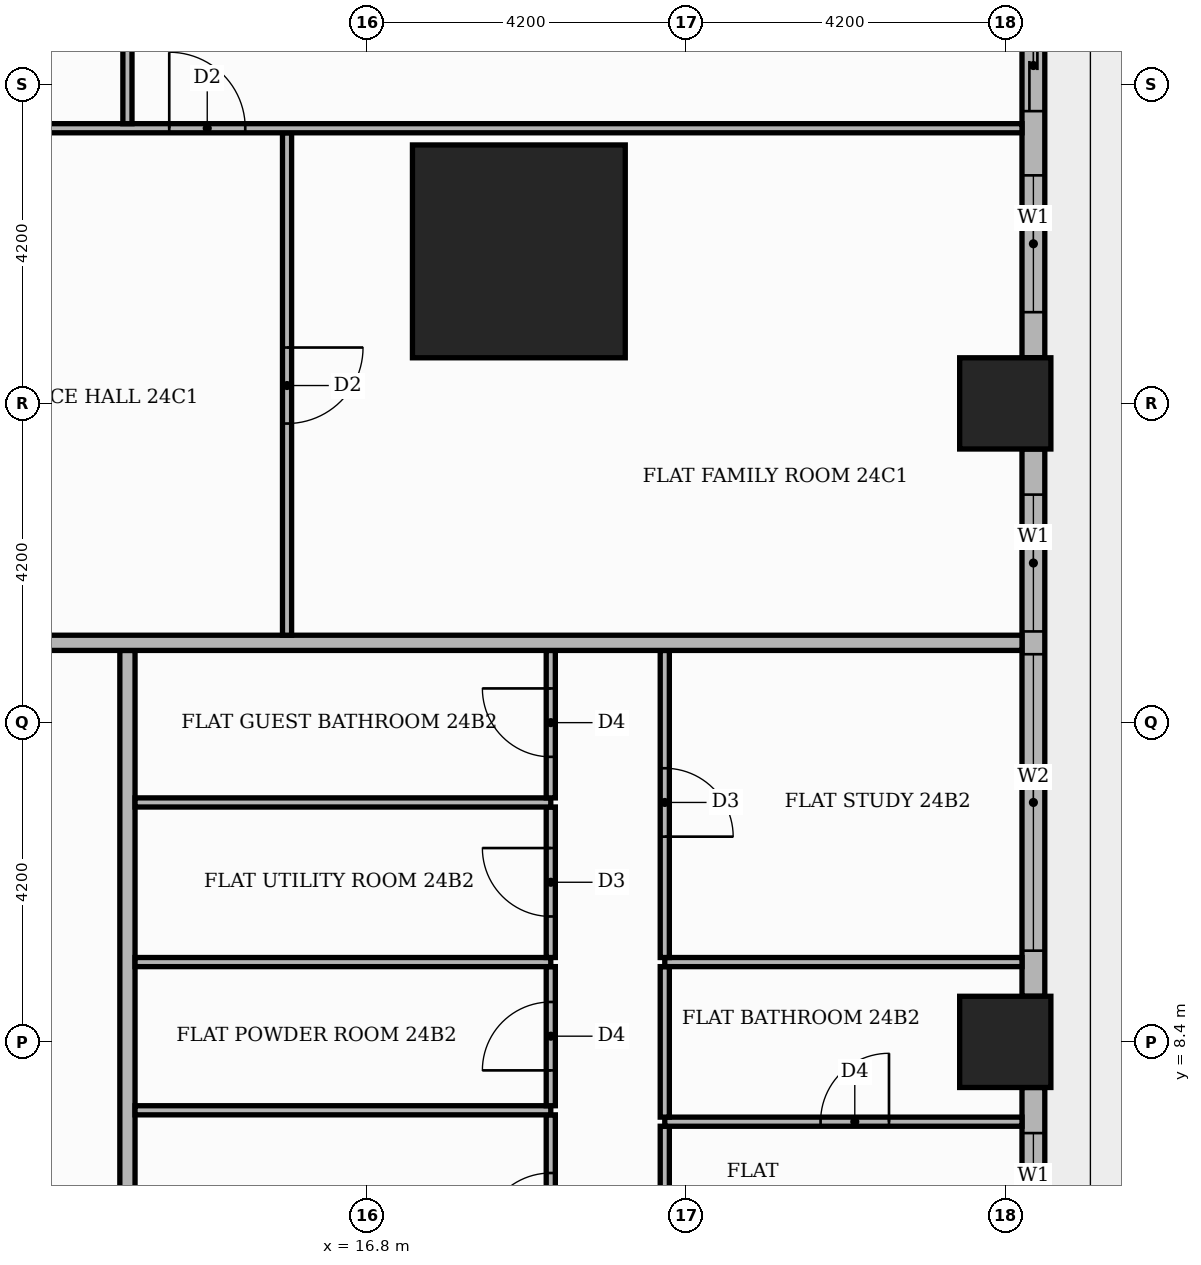
"""IFC4 building model, lengths in metres.
Left out: names, types, materials, properties, quantities, classifications, styles, units other than length and angle.
Written with IfcOpenShell. Run it as: python <this file> out.ifc"""

import sys

from ifc_helpers import new_model, si_unit, direction, frame, frame_2d, origin, origin_2d, place, context, subcontext, project, spatial, rectangle, extrude, element, fill, save


model = new_model("IFC4")
c1 = context("Model", 3, precision=1e-05, world=origin(), true_north=direction((0.0, 1.0)))
c2 = subcontext(c1, "Body", "Model", "MODEL_VIEW")
j1 = project(units=[si_unit("LENGTHUNIT", "METRE"), si_unit("PLANEANGLEUNIT", "RADIAN")], contexts=[c1])
p1 = place(None, origin())
s1 = spatial("IfcSite", under=j1, at=p1, CompositionType="ELEMENT")
p2 = place(p1, origin())
s2 = spatial("IfcBuilding", under=s1, at=p2, CompositionType="ELEMENT")
p3 = place(p2, frame((0.0, 0.0, 102.6)))
s3 = spatial("IfcBuildingStorey", under=s2, at=p3, CompositionType="ELEMENT", Elevation=102.6)
p4 = place(p3, frame((18.8, 18.8, 0.0), z_axis=(0.0, 0.0, 1.0), x_axis=(1.0, 0.0, 0.0)))
e1 = element("IfcColumn", 1, at=p4, inside=s3, PredefinedType="COLUMN", context=c2, shape_type="SweptSolid", body=[
    extrude(rectangle(XDim=2.8, YDim=2.8, at=origin_2d()), origin(), (0.0, 0.0, 1.0), 3.9),
])
for number, where, z_axis, x_axis in (
    (2, (25.2, 8.4, 0.0), (0.0, 0.0, 1.0), (1.0, 0.0, 0.0)),
    (3, (25.2, 16.8, 0.0), (0.0, 0.0, 1.0), (1.0, 0.0, 0.0)),
):
    element("IfcColumn", number, at=place(p3, frame(where, z_axis=z_axis, x_axis=x_axis)), inside=s3, PredefinedType="COLUMN", context=c2, shape_type="SweptSolid", body=[
        extrude(rectangle(XDim=1.2, YDim=1.2, at=origin_2d()), origin(), (0.0, 0.0, 1.0), 3.9),
    ])
p5 = place(p3, frame((25.57, 0.6, 0.0), z_axis=(0.0, 0.0, 1.0), x_axis=(0.0, 1.0, 0.0)))
e4 = element("IfcWall", 4, at=p5, inside=s3, PredefinedType="STANDARD", context=c2, shape_type="SweptSolid", body=[
    extrude(rectangle(XDim=7.2, YDim=0.3, at=frame_2d((3.6, 0.0))), origin(), (0.0, 0.0, 1.0), 3.48),
])
p6 = place(p5, frame((0.6, 0.0, 0.0)))
e5 = element("IfcOpeningElement", 5, at=p6, cuts=e4, PredefinedType="OPENING", context=c2, shape_type="SweptSolid", body=[
    extrude(rectangle(XDim=1.8, YDim=2.4, at=frame_2d((0.9, 1.2))), frame((0.0, 0.16, 0.0), z_axis=(0.0, -1.0, 0.0), x_axis=(1.0, 0.0, 0.0)), (0.0, 0.0, 1.0), 0.32),
])
p7 = place(p5, frame((2.7, 0.0, 0.9)))
e6 = element("IfcOpeningElement", 6, at=p7, cuts=e4, PredefinedType="OPENING", context=c2, shape_type="SweptSolid", body=[
    extrude(rectangle(XDim=1.8, YDim=2.1, at=frame_2d((0.9, 1.05))), frame((0.0, 0.16, 0.0), z_axis=(0.0, -1.0, 0.0), x_axis=(1.0, 0.0, 0.0)), (0.0, 0.0, 1.0), 0.32),
])
p8 = place(p5, frame((4.8, 0.0, 0.9)))
e7 = element("IfcOpeningElement", 7, at=p8, cuts=e4, PredefinedType="OPENING", context=c2, shape_type="SweptSolid", body=[
    extrude(rectangle(XDim=1.8, YDim=2.1, at=frame_2d((0.9, 1.05))), frame((0.0, 0.16, 0.0), z_axis=(0.0, -1.0, 0.0), x_axis=(1.0, 0.0, 0.0)), (0.0, 0.0, 1.0), 0.32),
])
p9 = place(p3, frame((25.57, 9.0, 0.0), z_axis=(0.0, 0.0, 1.0), x_axis=(0.0, 1.0, 0.0)))
e8 = element("IfcWall", 8, at=p9, inside=s3, PredefinedType="STANDARD", context=c2, shape_type="SweptSolid", body=[
    extrude(rectangle(XDim=7.2, YDim=0.3, at=frame_2d((3.6, 0.0))), origin(), (0.0, 0.0, 1.0), 3.48),
])
p10 = place(p9, frame((0.6, 0.0, 0.9)))
e9 = element("IfcOpeningElement", 9, at=p10, cuts=e8, PredefinedType="OPENING", context=c2, shape_type="SweptSolid", body=[
    extrude(rectangle(XDim=3.9, YDim=2.1, at=frame_2d((1.95, 1.05))), frame((0.0, 0.16, 0.0), z_axis=(0.0, -1.0, 0.0), x_axis=(1.0, 0.0, 0.0)), (0.0, 0.0, 1.0), 0.32),
])
p11 = place(p9, frame((4.8, 0.0, 0.9)))
e10 = element("IfcOpeningElement", 10, at=p11, cuts=e8, PredefinedType="OPENING", context=c2, shape_type="SweptSolid", body=[
    extrude(rectangle(XDim=1.8, YDim=2.1, at=frame_2d((0.9, 1.05))), frame((0.0, 0.16, 0.0), z_axis=(0.0, -1.0, 0.0), x_axis=(1.0, 0.0, 0.0)), (0.0, 0.0, 1.0), 0.32),
])
p12 = place(p3, frame((25.57, 17.4, 0.0), z_axis=(0.0, 0.0, 1.0), x_axis=(0.0, 1.0, 0.0)))
e11 = element("IfcWall", 11, at=p12, inside=s3, PredefinedType="STANDARD", context=c2, shape_type="SweptSolid", body=[
    extrude(rectangle(XDim=4.82, YDim=0.3, at=frame_2d((2.41, 0.0))), origin(), (0.0, 0.0, 1.0), 3.48),
])
p13 = place(p12, frame((0.6, 0.0, 0.9)))
e12 = element("IfcOpeningElement", 12, at=p13, cuts=e11, PredefinedType="OPENING", context=c2, shape_type="SweptSolid", body=[
    extrude(rectangle(XDim=1.8, YDim=2.1, at=frame_2d((0.9, 1.05))), frame((0.0, 0.16, 0.0), z_axis=(0.0, -1.0, 0.0), x_axis=(1.0, 0.0, 0.0)), (0.0, 0.0, 1.0), 0.32),
])
p14 = place(p12, frame((3.245, 0.0, 0.0)))
e13 = element("IfcOpeningElement", 13, at=p14, cuts=e11, PredefinedType="OPENING", context=c2, shape_type="SweptSolid", body=[
    extrude(rectangle(XDim=1.2, YDim=2.4, at=frame_2d((0.6, 1.2))), frame((0.0, 0.16, 0.0), z_axis=(0.0, -1.0, 0.0), x_axis=(1.0, 0.0, 0.0)), (0.0, 0.0, 1.0), 0.32),
])
p15 = place(p3, frame((13.65, -5.15, 0.0), z_axis=(0.0, 0.0, 1.0), x_axis=(0.0, 1.0, 0.0)))
e14 = element("IfcWall", 14, at=p15, inside=s3, PredefinedType="PARTITIONING", context=c2, shape_type="SweptSolid", body=[
    extrude(rectangle(XDim=18.7, YDim=0.2, at=frame_2d((9.35, 0.0))), origin(), (0.0, 0.0, 1.0), 3.48),
])
p16 = place(p15, frame((1.45, 0.0, 0.0)))
e15 = element("IfcOpeningElement", 15, at=p16, cuts=e14, PredefinedType="OPENING", context=c2, shape_type="SweptSolid", body=[
    extrude(rectangle(XDim=1.1, YDim=2.4, at=frame_2d((0.55, 1.2))), frame((0.0, 0.11, 0.0), z_axis=(0.0, -1.0, 0.0), x_axis=(1.0, 0.0, 0.0)), (0.0, 0.0, 1.0), 0.22),
])
p17 = place(p3, frame((19.22, 5.01, 0.0), z_axis=(0.0, 0.0, 1.0), x_axis=(0.0, 1.0, 0.0)))
e16 = element("IfcWall", 16, at=p17, inside=s3, PredefinedType="PARTITIONING", context=c2, shape_type="SweptSolid", body=[
    extrude(rectangle(XDim=2.43, YDim=0.12, at=frame_2d((1.215, 0.0))), origin(), (0.0, 0.0, 1.0), 3.48),
])
p18 = place(p17, frame((0.765, 0.0, 0.0)))
e17 = element("IfcOpeningElement", 17, at=p18, cuts=e16, PredefinedType="OPENING", context=c2, shape_type="SweptSolid", body=[
    extrude(rectangle(XDim=0.9, YDim=2.1, at=frame_2d((0.45, 1.05))), frame((0.0, 0.07, 0.0), z_axis=(0.0, -1.0, 0.0), x_axis=(1.0, 0.0, 0.0)), (0.0, 0.0, 1.0), 0.14),
])
p19 = place(p3, frame((20.72, 5.31, 0.0), z_axis=(0.0, 0.0, 1.0), x_axis=(0.0, 1.0, 0.0)))
e18 = element("IfcWall", 18, at=p19, inside=s3, PredefinedType="PARTITIONING", context=c2, shape_type="SweptSolid", body=[
    extrude(rectangle(XDim=1.98, YDim=0.12, at=frame_2d((0.99, 0.0))), origin(), (0.0, 0.0, 1.0), 3.48),
])
p20 = place(p3, frame((20.72, 7.35, 0.0), z_axis=(0.0, 0.0, 1.0), x_axis=(1.0, 0.0, 0.0)))
e19 = element("IfcWall", 19, at=p20, inside=s3, PredefinedType="PARTITIONING", context=c2, shape_type="SweptSolid", body=[
    extrude(rectangle(XDim=4.7, YDim=0.12, at=frame_2d((2.35, 0.0))), origin(), (0.0, 0.0, 1.0), 3.48),
])
p21 = place(p20, frame((2.05, 0.0, 0.0)))
e20 = element("IfcOpeningElement", 20, at=p21, cuts=e19, PredefinedType="OPENING", context=c2, shape_type="SweptSolid", body=[
    extrude(rectangle(XDim=0.9, YDim=2.1, at=frame_2d((0.45, 1.05))), frame((0.0, 0.07, 0.0), z_axis=(0.0, -1.0, 0.0), x_axis=(1.0, 0.0, 0.0)), (0.0, 0.0, 1.0), 0.14),
])
p22 = place(p3, frame((20.72, 7.41, 0.0), z_axis=(0.0, 0.0, 1.0), x_axis=(0.0, 1.0, 0.0)))
e21 = element("IfcWall", 21, at=p22, inside=s3, PredefinedType="PARTITIONING", context=c2, shape_type="SweptSolid", body=[
    extrude(rectangle(XDim=1.98, YDim=0.12, at=frame_2d((0.99, 0.0))), origin(), (0.0, 0.0, 1.0), 3.48),
])
p23 = place(p3, frame((13.75, 7.5, 0.0), z_axis=(0.0, 0.0, 1.0), x_axis=(1.0, 0.0, 0.0)))
e22 = element("IfcWall", 22, at=p23, inside=s3, PredefinedType="PARTITIONING", context=c2, shape_type="SweptSolid", body=[
    extrude(rectangle(XDim=5.47, YDim=0.12, at=frame_2d((2.735, 0.0))), origin(), (0.0, 0.0, 1.0), 3.48),
])
p24 = place(p3, frame((19.22, 7.56, 0.0), z_axis=(0.0, 0.0, 1.0), x_axis=(0.0, 1.0, 0.0)))
e23 = element("IfcWall", 23, at=p24, inside=s3, PredefinedType="PARTITIONING", context=c2, shape_type="SweptSolid", body=[
    extrude(rectangle(XDim=1.83, YDim=0.12, at=frame_2d((0.915, 0.0))), origin(), (0.0, 0.0, 1.0), 3.48),
])
p25 = place(p24, frame((0.465, 0.0, 0.0)))
e24 = element("IfcOpeningElement", 24, at=p25, cuts=e23, PredefinedType="OPENING", context=c2, shape_type="SweptSolid", body=[
    extrude(rectangle(XDim=0.9, YDim=2.1, at=frame_2d((0.45, 1.05))), frame((0.0, 0.07, 0.0), z_axis=(0.0, -1.0, 0.0), x_axis=(1.0, 0.0, 0.0)), (0.0, 0.0, 1.0), 0.14),
])
p26 = place(p3, frame((13.75, 9.45, 0.0), z_axis=(0.0, 0.0, 1.0), x_axis=(1.0, 0.0, 0.0)))
e25 = element("IfcWall", 25, at=p26, inside=s3, PredefinedType="PARTITIONING", context=c2, shape_type="SweptSolid", body=[
    extrude(rectangle(XDim=5.47, YDim=0.12, at=frame_2d((2.735, 0.0))), origin(), (0.0, 0.0, 1.0), 3.48),
])
p27 = place(p3, frame((20.72, 9.45, 0.0), z_axis=(0.0, 0.0, 1.0), x_axis=(1.0, 0.0, 0.0)))
e26 = element("IfcWall", 26, at=p27, inside=s3, PredefinedType="PARTITIONING", context=c2, shape_type="SweptSolid", body=[
    extrude(rectangle(XDim=4.7, YDim=0.12, at=frame_2d((2.35, 0.0))), origin(), (0.0, 0.0, 1.0), 3.48),
])
p28 = place(p3, frame((19.22, 9.51, 0.0), z_axis=(0.0, 0.0, 1.0), x_axis=(0.0, 1.0, 0.0)))
e27 = element("IfcWall", 27, at=p28, inside=s3, PredefinedType="PARTITIONING", context=c2, shape_type="SweptSolid", body=[
    extrude(rectangle(XDim=1.98, YDim=0.12, at=frame_2d((0.99, 0.0))), origin(), (0.0, 0.0, 1.0), 3.48),
])
p29 = place(p28, frame((0.54, 0.0, 0.0)))
e28 = element("IfcOpeningElement", 28, at=p29, cuts=e27, PredefinedType="OPENING", context=c2, shape_type="SweptSolid", body=[
    extrude(rectangle(XDim=0.9, YDim=2.1, at=frame_2d((0.45, 1.05))), frame((0.0, 0.07, 0.0), z_axis=(0.0, -1.0, 0.0), x_axis=(1.0, 0.0, 0.0)), (0.0, 0.0, 1.0), 0.14),
])
p30 = place(p3, frame((20.72, 9.51, 0.0), z_axis=(0.0, 0.0, 1.0), x_axis=(0.0, 1.0, 0.0)))
e29 = element("IfcWall", 29, at=p30, inside=s3, PredefinedType="PARTITIONING", context=c2, shape_type="SweptSolid", body=[
    extrude(rectangle(XDim=4.04, YDim=0.12, at=frame_2d((2.02, 0.0))), origin(), (0.0, 0.0, 1.0), 3.48),
])
p31 = place(p30, frame((1.59, 0.0, 0.0)))
e30 = element("IfcOpeningElement", 30, at=p31, cuts=e29, PredefinedType="OPENING", context=c2, shape_type="SweptSolid", body=[
    extrude(rectangle(XDim=0.9, YDim=2.1, at=frame_2d((0.45, 1.05))), frame((0.0, 0.07, 0.0), z_axis=(0.0, -1.0, 0.0), x_axis=(1.0, 0.0, 0.0)), (0.0, 0.0, 1.0), 0.14),
])
p32 = place(p3, frame((13.75, 11.55, 0.0), z_axis=(0.0, 0.0, 1.0), x_axis=(1.0, 0.0, 0.0)))
e31 = element("IfcWall", 31, at=p32, inside=s3, PredefinedType="PARTITIONING", context=c2, shape_type="SweptSolid", body=[
    extrude(rectangle(XDim=5.47, YDim=0.12, at=frame_2d((2.735, 0.0))), origin(), (0.0, 0.0, 1.0), 3.48),
])
p33 = place(p3, frame((19.22, 11.61, 0.0), z_axis=(0.0, 0.0, 1.0), x_axis=(0.0, 1.0, 0.0)))
e32 = element("IfcWall", 32, at=p33, inside=s3, PredefinedType="PARTITIONING", context=c2, shape_type="SweptSolid", body=[
    extrude(rectangle(XDim=1.94, YDim=0.12, at=frame_2d((0.97, 0.0))), origin(), (0.0, 0.0, 1.0), 3.48),
])
p34 = place(p33, frame((0.54, 0.0, 0.0)))
e33 = element("IfcOpeningElement", 33, at=p34, cuts=e32, PredefinedType="OPENING", context=c2, shape_type="SweptSolid", body=[
    extrude(rectangle(XDim=0.9, YDim=2.1, at=frame_2d((0.45, 1.05))), frame((0.0, 0.07, 0.0), z_axis=(0.0, -1.0, 0.0), x_axis=(1.0, 0.0, 0.0)), (0.0, 0.0, 1.0), 0.14),
])
p35 = place(p3, frame((-13.65, 13.65, 0.0), z_axis=(0.0, 0.0, 1.0), x_axis=(1.0, 0.0, 0.0)))
e34 = element("IfcWall", 34, at=p35, inside=s3, PredefinedType="PARTITIONING", context=c2, shape_type="SweptSolid", body=[
    extrude(rectangle(XDim=39.07, YDim=0.2, at=frame_2d((19.535, 0.0))), origin(), (0.0, 0.0, 1.0), 3.48),
])
p36 = place(p35, frame((24.65, 0.0, 0.0)))
e35 = element("IfcOpeningElement", 35, at=p36, cuts=e34, PredefinedType="OPENING", context=c2, shape_type="SweptSolid", body=[
    extrude(rectangle(XDim=1.1, YDim=2.4, at=frame_2d((0.55, 1.2))), frame((0.0, 0.11, 0.0), z_axis=(0.0, -1.0, 0.0), x_axis=(1.0, 0.0, 0.0)), (0.0, 0.0, 1.0), 0.22),
])
p37 = place(p35, frame((14.15, 0.0, 0.0)))
e36 = element("IfcOpeningElement", 36, at=p37, cuts=e34, PredefinedType="OPENING", context=c2, shape_type="SweptSolid", body=[
    extrude(rectangle(XDim=1.1, YDim=2.4, at=frame_2d((0.55, 1.2))), frame((0.0, 0.11, 0.0), z_axis=(0.0, -1.0, 0.0), x_axis=(1.0, 0.0, 0.0)), (0.0, 0.0, 1.0), 0.22),
])
p38 = place(p3, frame((15.75, 13.75, 0.0), z_axis=(0.0, 0.0, 1.0), x_axis=(0.0, 1.0, 0.0)))
e37 = element("IfcWall", 37, at=p38, inside=s3, PredefinedType="PARTITIONING", context=c2, shape_type="SweptSolid", body=[
    extrude(rectangle(XDim=6.61, YDim=0.12, at=frame_2d((3.305, 0.0))), origin(), (0.0, 0.0, 1.0), 3.48),
])
p39 = place(p38, frame((2.785, 0.0, 0.0)))
e38 = element("IfcOpeningElement", 38, at=p39, cuts=e37, PredefinedType="OPENING", context=c2, shape_type="SweptSolid", body=[
    extrude(rectangle(XDim=1.0, YDim=2.1, at=frame_2d((0.5, 1.05))), frame((0.0, 0.07, 0.0), z_axis=(0.0, -1.0, 0.0), x_axis=(1.0, 0.0, 0.0)), (0.0, 0.0, 1.0), 0.14),
])
p40 = place(p3, frame((5.35, 20.42, 0.0), z_axis=(0.0, 0.0, 1.0), x_axis=(1.0, 0.0, 0.0)))
e39 = element("IfcWall", 39, at=p40, inside=s3, PredefinedType="PARTITIONING", context=c2, shape_type="SweptSolid", body=[
    extrude(rectangle(XDim=20.07, YDim=0.12, at=frame_2d((10.035, 0.0))), origin(), (0.0, 0.0, 1.0), 3.48),
])
p41 = place(p40, frame((8.85, 0.0, 0.0)))
e40 = element("IfcOpeningElement", 40, at=p41, cuts=e39, PredefinedType="OPENING", context=c2, shape_type="SweptSolid", body=[
    extrude(rectangle(XDim=1.0, YDim=2.1, at=frame_2d((0.5, 1.05))), frame((0.0, 0.07, 0.0), z_axis=(0.0, -1.0, 0.0), x_axis=(1.0, 0.0, 0.0)), (0.0, 0.0, 1.0), 0.14),
])
p42 = place(p40, frame((5.75, 0.0, 0.0)))
e41 = element("IfcOpeningElement", 41, at=p42, cuts=e39, PredefinedType="OPENING", context=c2, shape_type="SweptSolid", body=[
    extrude(rectangle(XDim=0.9, YDim=2.1, at=frame_2d((0.45, 1.05))), frame((0.0, 0.07, 0.0), z_axis=(0.0, -1.0, 0.0), x_axis=(1.0, 0.0, 0.0)), (0.0, 0.0, 1.0), 0.14),
])
p43 = place(p3, frame((13.65, 20.48, 0.0), z_axis=(0.0, 0.0, 1.0), x_axis=(0.0, 1.0, 0.0)))
e42 = element("IfcWall", 42, at=p43, inside=s3, PredefinedType="PARTITIONING", context=c2, shape_type="SweptSolid", body=[
    extrude(rectangle(XDim=4.94, YDim=0.12, at=frame_2d((2.47, 0.0))), origin(), (0.0, 0.0, 1.0), 3.48),
])
p44 = place(p8, origin())
e43 = element("IfcWindow", 43, at=p44, inside=s3, PartitioningType="SINGLE_PANEL", PredefinedType="WINDOW", context=c2, shape_type="SweptSolid", body=[
    extrude(rectangle(XDim=1.8, YDim=2.1, at=frame_2d((0.9, 1.05))), frame((0.0, 0.03, 0.0), z_axis=(0.0, -1.0, 0.0), x_axis=(1.0, 0.0, 0.0)), (0.0, 0.0, 1.0), 0.06),
])
fill(e7, e43)
p45 = place(p10, origin())
e44 = element("IfcWindow", 44, at=p45, inside=s3, PartitioningType="SINGLE_PANEL", PredefinedType="WINDOW", context=c2, shape_type="SweptSolid", body=[
    extrude(rectangle(XDim=3.9, YDim=2.1, at=frame_2d((1.95, 1.05))), frame((0.0, 0.03, 0.0), z_axis=(0.0, -1.0, 0.0), x_axis=(1.0, 0.0, 0.0)), (0.0, 0.0, 1.0), 0.06),
])
fill(e9, e44)
p46 = place(p11, origin())
e45 = element("IfcWindow", 45, at=p46, inside=s3, PartitioningType="SINGLE_PANEL", PredefinedType="WINDOW", context=c2, shape_type="SweptSolid", body=[
    extrude(rectangle(XDim=1.8, YDim=2.1, at=frame_2d((0.9, 1.05))), frame((0.0, 0.03, 0.0), z_axis=(0.0, -1.0, 0.0), x_axis=(1.0, 0.0, 0.0)), (0.0, 0.0, 1.0), 0.06),
])
fill(e10, e45)
p47 = place(p13, origin())
e46 = element("IfcWindow", 46, at=p47, inside=s3, PartitioningType="SINGLE_PANEL", PredefinedType="WINDOW", context=c2, shape_type="SweptSolid", body=[
    extrude(rectangle(XDim=1.8, YDim=2.1, at=frame_2d((0.9, 1.05))), frame((0.0, 0.03, 0.0), z_axis=(0.0, -1.0, 0.0), x_axis=(1.0, 0.0, 0.0)), (0.0, 0.0, 1.0), 0.06),
])
fill(e12, e46)
p48 = place(p14, origin())
e47 = element("IfcDoor", 47, at=p48, inside=s3, OperationType="SLIDING_TO_RIGHT", PredefinedType="DOOR", context=c2, shape_type="SweptSolid", body=[
    extrude(rectangle(XDim=1.2, YDim=2.4, at=frame_2d((0.6, 1.2))), frame((0.0, 0.025, 0.0), z_axis=(0.0, -1.0, 0.0), x_axis=(1.0, 0.0, 0.0)), (0.0, 0.0, 1.0), 0.05),
])
fill(e13, e47)
p49 = place(p18, origin())
e48 = element("IfcDoor", 48, at=p49, inside=s3, OperationType="SINGLE_SWING_LEFT", PredefinedType="DOOR", context=c2, shape_type="SweptSolid", body=[
    extrude(rectangle(XDim=0.9, YDim=2.1, at=frame_2d((0.45, 1.05))), frame((0.0, 0.025, 0.0), z_axis=(0.0, -1.0, 0.0), x_axis=(1.0, 0.0, 0.0)), (0.0, 0.0, 1.0), 0.05),
])
fill(e17, e48)
p50 = place(p25, origin())
e49 = element("IfcDoor", 49, at=p50, inside=s3, OperationType="SINGLE_SWING_LEFT", PredefinedType="DOOR", context=c2, shape_type="SweptSolid", body=[
    extrude(rectangle(XDim=0.9, YDim=2.1, at=frame_2d((0.45, 1.05))), frame((0.0, 0.025, 0.0), z_axis=(0.0, -1.0, 0.0), x_axis=(1.0, 0.0, 0.0)), (0.0, 0.0, 1.0), 0.05),
])
fill(e24, e49)
p51 = place(p29, origin())
e50 = element("IfcDoor", 50, at=p51, inside=s3, OperationType="SINGLE_SWING_RIGHT", PredefinedType="DOOR", context=c2, shape_type="SweptSolid", body=[
    extrude(rectangle(XDim=0.9, YDim=2.1, at=frame_2d((0.45, 1.05))), frame((0.0, 0.025, 0.0), z_axis=(0.0, -1.0, 0.0), x_axis=(1.0, 0.0, 0.0)), (0.0, 0.0, 1.0), 0.05),
])
fill(e28, e50)
p52 = place(p34, origin())
e51 = element("IfcDoor", 51, at=p52, inside=s3, OperationType="SINGLE_SWING_RIGHT", PredefinedType="DOOR", context=c2, shape_type="SweptSolid", body=[
    extrude(rectangle(XDim=0.9, YDim=2.1, at=frame_2d((0.45, 1.05))), frame((0.0, 0.025, 0.0), z_axis=(0.0, -1.0, 0.0), x_axis=(1.0, 0.0, 0.0)), (0.0, 0.0, 1.0), 0.05),
])
fill(e33, e51)
p53 = place(p21, origin())
e52 = element("IfcDoor", 52, at=p53, inside=s3, OperationType="SINGLE_SWING_RIGHT", PredefinedType="DOOR", context=c2, shape_type="SweptSolid", body=[
    extrude(rectangle(XDim=0.9, YDim=2.1, at=frame_2d((0.45, 1.05))), frame((0.0, 0.025, 0.0), z_axis=(0.0, -1.0, 0.0), x_axis=(1.0, 0.0, 0.0)), (0.0, 0.0, 1.0), 0.05),
])
fill(e20, e52)
p54 = place(p31, frame((0.9, 0.0, 0.0), z_axis=(0.0, 0.0, 1.0), x_axis=(-1.0, 0.0, 0.0)))
e53 = element("IfcDoor", 53, at=p54, inside=s3, OperationType="SINGLE_SWING_LEFT", PredefinedType="DOOR", context=c2, shape_type="SweptSolid", body=[
    extrude(rectangle(XDim=0.9, YDim=2.1, at=frame_2d((0.45, 1.05))), frame((0.0, 0.025, 0.0), z_axis=(0.0, -1.0, 0.0), x_axis=(1.0, 0.0, 0.0)), (0.0, 0.0, 1.0), 0.05),
])
fill(e30, e53)
p55 = place(p39, frame((1.0, 0.0, 0.0), z_axis=(0.0, 0.0, 1.0), x_axis=(-1.0, 0.0, 0.0)))
e54 = element("IfcDoor", 54, at=p55, inside=s3, OperationType="SINGLE_SWING_RIGHT", PredefinedType="DOOR", context=c2, shape_type="SweptSolid", body=[
    extrude(rectangle(XDim=1.0, YDim=2.1, at=frame_2d((0.5, 1.05))), frame((0.0, 0.025, 0.0), z_axis=(0.0, -1.0, 0.0), x_axis=(1.0, 0.0, 0.0)), (0.0, 0.0, 1.0), 0.05),
])
fill(e38, e54)
p56 = place(p41, origin())
e55 = element("IfcDoor", 55, at=p56, inside=s3, OperationType="SINGLE_SWING_LEFT", PredefinedType="DOOR", context=c2, shape_type="SweptSolid", body=[
    extrude(rectangle(XDim=1.0, YDim=2.1, at=frame_2d((0.5, 1.05))), frame((0.0, 0.025, 0.0), z_axis=(0.0, -1.0, 0.0), x_axis=(1.0, 0.0, 0.0)), (0.0, 0.0, 1.0), 0.05),
])
fill(e40, e55)
save(model, sys.argv[1])
